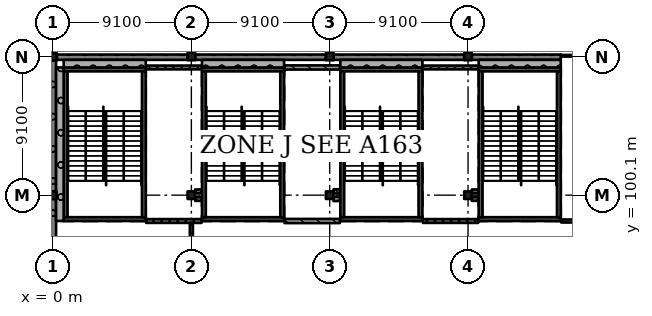
"""IFC4 building model, lengths in metres.
Left out: names, types, materials, properties, quantities, classifications, styles, units other than length and angle.
Written with IfcOpenShell. Run it as: python <this file> out.ifc"""

import sys

from ifc_helpers import new_model, si_unit, direction, frame, frame_2d, origin, origin_2d, place, context, subcontext, project, spatial, rectangle, extrude, element, fill, save


model = new_model("IFC4")
c1 = context("Model", 3, precision=1e-05, world=origin(), true_north=direction((0.0, 1.0)))
c2 = subcontext(c1, "Body", "Model", "MODEL_VIEW")
j1 = project(units=[si_unit("LENGTHUNIT", "METRE"), si_unit("PLANEANGLEUNIT", "RADIAN")], contexts=[c1])
p1 = place(None, origin())
s1 = spatial("IfcSite", under=j1, at=p1, CompositionType="ELEMENT")
p2 = place(p1, origin())
s2 = spatial("IfcBuilding", under=s1, at=p2, CompositionType="ELEMENT")
p3 = place(p2, frame((0.0, 0.0, 20.02)))
s3 = spatial("IfcBuildingStorey", under=s2, at=p3, CompositionType="ELEMENT", Elevation=20.02)
for number, where, z_axis, x_axis in (
    (1, (-0.025, 100.1, 0.0), (0.0, 0.0, 1.0), (1.0, 0.0, 0.0)),
    (2, (0.0, 109.2, 0.0), (0.0, 0.0, 1.0), (1.0, 0.0, 0.0)),
    (3, (9.1, 100.1, 0.0), (0.0, 0.0, 1.0), (1.0, 0.0, 0.0)),
    (4, (9.1, 109.225, 0.0), (0.0, 0.0, 1.0), (1.0, 0.0, 0.0)),
    (5, (18.2, 100.1, 0.0), (0.0, 0.0, 1.0), (1.0, 0.0, 0.0)),
    (6, (18.2, 109.225, 0.0), (0.0, 0.0, 1.0), (1.0, 0.0, 0.0)),
    (7, (27.3, 100.1, 0.0), (0.0, 0.0, 1.0), (1.0, 0.0, 0.0)),
    (8, (27.3, 109.225, 0.0), (0.0, 0.0, 1.0), (1.0, 0.0, 0.0)),
):
    element("IfcColumn", number, at=place(p3, frame(where, z_axis=z_axis, x_axis=x_axis)), inside=s3, PredefinedType="COLUMN", context=c2, shape_type="SweptSolid", body=[
        extrude(rectangle(XDim=0.5, YDim=0.5, at=origin_2d()), origin(), (0.0, 0.0, 1.0), 4.55),
    ])
p4 = place(p3, frame((6.1, 98.525, 0.0), z_axis=(0.0, 0.0, 1.0), x_axis=(-1.0, 0.0, 0.0)))
e9 = element("IfcWall", 9, at=p4, inside=s3, PredefinedType="SHEAR", context=c2, shape_type="SweptSolid", body=[
    extrude(rectangle(XDim=5.4, YDim=0.25, at=frame_2d((2.7, 0.0))), origin(), (0.0, 0.0, 1.0), 4.55),
])
p5 = place(p4, frame((1.5, 0.0, 0.0)))
e10 = element("IfcOpeningElement", 10, at=p5, cuts=e9, PredefinedType="OPENING", context=c2, shape_type="SweptSolid", body=[
    extrude(rectangle(XDim=2.4, YDim=2.1, at=frame_2d((1.2, 1.05))), frame((0.0, 0.135, 0.0), z_axis=(0.0, -1.0, 0.0), x_axis=(1.0, 0.0, 0.0)), (0.0, 0.0, 1.0), 0.27),
])
p6 = place(p3, frame((6.1, 108.375, 0.0), z_axis=(0.0, 0.0, 1.0), x_axis=(-1.0, 0.0, 0.0)))
e11 = element("IfcWall", 11, at=p6, inside=s3, PredefinedType="SHEAR", context=c2, shape_type="SweptSolid", body=[
    extrude(rectangle(XDim=5.4, YDim=0.25, at=frame_2d((2.7, 0.0))), origin(), (0.0, 0.0, 1.0), 4.55),
])
for number, where, z_axis, x_axis in (
    (12, (0.825, 108.25, 0.0), (0.0, 0.0, 1.0), (0.0, -1.0, 0.0)),
    (13, (5.975, 108.25, 0.0), (0.0, 0.0, 1.0), (0.0, -1.0, 0.0)),
):
    element("IfcWall", number, at=place(p3, frame(where, z_axis=z_axis, x_axis=x_axis)), inside=s3, PredefinedType="SHEAR", context=c2, shape_type="SweptSolid", body=[
        extrude(rectangle(XDim=9.6, YDim=0.25, at=frame_2d((4.8, 0.0))), origin(), (0.0, 0.0, 1.0), 4.55),
    ])
p7 = place(p3, frame((15.2, 98.525, 0.0), z_axis=(0.0, 0.0, 1.0), x_axis=(-1.0, 0.0, 0.0)))
e14 = element("IfcWall", 14, at=p7, inside=s3, PredefinedType="SHEAR", context=c2, shape_type="SweptSolid", body=[
    extrude(rectangle(XDim=5.4, YDim=0.25, at=frame_2d((2.7, 0.0))), origin(), (0.0, 0.0, 1.0), 4.55),
])
p8 = place(p7, frame((1.5, 0.0, 0.0)))
e15 = element("IfcOpeningElement", 15, at=p8, cuts=e14, PredefinedType="OPENING", context=c2, shape_type="SweptSolid", body=[
    extrude(rectangle(XDim=2.4, YDim=2.1, at=frame_2d((1.2, 1.05))), frame((0.0, 0.135, 0.0), z_axis=(0.0, -1.0, 0.0), x_axis=(1.0, 0.0, 0.0)), (0.0, 0.0, 1.0), 0.27),
])
p9 = place(p3, frame((15.2, 108.375, 0.0), z_axis=(0.0, 0.0, 1.0), x_axis=(-1.0, 0.0, 0.0)))
e16 = element("IfcWall", 16, at=p9, inside=s3, PredefinedType="SHEAR", context=c2, shape_type="SweptSolid", body=[
    extrude(rectangle(XDim=5.4, YDim=0.25, at=frame_2d((2.7, 0.0))), origin(), (0.0, 0.0, 1.0), 4.55),
])
for number, where, z_axis, x_axis in (
    (17, (9.925, 108.25, 0.0), (0.0, 0.0, 1.0), (0.0, -1.0, 0.0)),
    (18, (15.075, 108.25, 0.0), (0.0, 0.0, 1.0), (0.0, -1.0, 0.0)),
):
    element("IfcWall", number, at=place(p3, frame(where, z_axis=z_axis, x_axis=x_axis)), inside=s3, PredefinedType="SHEAR", context=c2, shape_type="SweptSolid", body=[
        extrude(rectangle(XDim=9.6, YDim=0.25, at=frame_2d((4.8, 0.0))), origin(), (0.0, 0.0, 1.0), 4.55),
    ])
p10 = place(p3, frame((24.3, 98.525, 0.0), z_axis=(0.0, 0.0, 1.0), x_axis=(-1.0, 0.0, 0.0)))
e19 = element("IfcWall", 19, at=p10, inside=s3, PredefinedType="SHEAR", context=c2, shape_type="SweptSolid", body=[
    extrude(rectangle(XDim=5.4, YDim=0.25, at=frame_2d((2.7, 0.0))), origin(), (0.0, 0.0, 1.0), 4.55),
])
p11 = place(p10, frame((1.5, 0.0, 0.0)))
e20 = element("IfcOpeningElement", 20, at=p11, cuts=e19, PredefinedType="OPENING", context=c2, shape_type="SweptSolid", body=[
    extrude(rectangle(XDim=2.4, YDim=2.1, at=frame_2d((1.2, 1.05))), frame((0.0, 0.135, 0.0), z_axis=(0.0, -1.0, 0.0), x_axis=(1.0, 0.0, 0.0)), (0.0, 0.0, 1.0), 0.27),
])
p12 = place(p3, frame((24.3, 108.375, 0.0), z_axis=(0.0, 0.0, 1.0), x_axis=(-1.0, 0.0, 0.0)))
e21 = element("IfcWall", 21, at=p12, inside=s3, PredefinedType="SHEAR", context=c2, shape_type="SweptSolid", body=[
    extrude(rectangle(XDim=5.4, YDim=0.25, at=frame_2d((2.7, 0.0))), origin(), (0.0, 0.0, 1.0), 4.55),
])
for number, where, z_axis, x_axis in (
    (22, (19.025, 108.25, 0.0), (0.0, 0.0, 1.0), (0.0, -1.0, 0.0)),
    (23, (24.175, 108.25, 0.0), (0.0, 0.0, 1.0), (0.0, -1.0, 0.0)),
):
    element("IfcWall", number, at=place(p3, frame(where, z_axis=z_axis, x_axis=x_axis)), inside=s3, PredefinedType="SHEAR", context=c2, shape_type="SweptSolid", body=[
        extrude(rectangle(XDim=9.6, YDim=0.25, at=frame_2d((4.8, 0.0))), origin(), (0.0, 0.0, 1.0), 4.55),
    ])
p13 = place(p3, frame((33.4, 98.525, 0.0), z_axis=(0.0, 0.0, 1.0), x_axis=(-1.0, 0.0, 0.0)))
e24 = element("IfcWall", 24, at=p13, inside=s3, PredefinedType="SHEAR", context=c2, shape_type="SweptSolid", body=[
    extrude(rectangle(XDim=5.4, YDim=0.25, at=frame_2d((2.7, 0.0))), origin(), (0.0, 0.0, 1.0), 4.55),
])
p14 = place(p13, frame((1.5, 0.0, 0.0)))
e25 = element("IfcOpeningElement", 25, at=p14, cuts=e24, PredefinedType="OPENING", context=c2, shape_type="SweptSolid", body=[
    extrude(rectangle(XDim=2.4, YDim=2.1, at=frame_2d((1.2, 1.05))), frame((0.0, 0.135, 0.0), z_axis=(0.0, -1.0, 0.0), x_axis=(1.0, 0.0, 0.0)), (0.0, 0.0, 1.0), 0.27),
])
p15 = place(p3, frame((33.4, 108.375, 0.0), z_axis=(0.0, 0.0, 1.0), x_axis=(-1.0, 0.0, 0.0)))
e26 = element("IfcWall", 26, at=p15, inside=s3, PredefinedType="SHEAR", context=c2, shape_type="SweptSolid", body=[
    extrude(rectangle(XDim=5.4, YDim=0.25, at=frame_2d((2.7, 0.0))), origin(), (0.0, 0.0, 1.0), 4.55),
])
for number, where, z_axis, x_axis in (
    (27, (28.125, 108.25, 0.0), (0.0, 0.0, 1.0), (0.0, -1.0, 0.0)),
    (28, (33.275, 108.25, 0.0), (0.0, 0.0, 1.0), (0.0, -1.0, 0.0)),
):
    element("IfcWall", number, at=place(p3, frame(where, z_axis=z_axis, x_axis=x_axis)), inside=s3, PredefinedType="SHEAR", context=c2, shape_type="SweptSolid", body=[
        extrude(rectangle(XDim=9.6, YDim=0.25, at=frame_2d((4.8, 0.0))), origin(), (0.0, 0.0, 1.0), 4.55),
    ])
p16 = place(p3, frame((33.4, 109.175, 0.0), z_axis=(0.0, 0.0, 1.0), x_axis=(-1.0, 0.0, 0.0)))
e29 = element("IfcWall", 29, at=p16, inside=s3, PredefinedType="SOLIDWALL", context=c2, shape_type="SweptSolid", body=[
    extrude(rectangle(XDim=5.85, YDim=0.35, at=frame_2d((2.925, 0.0))), origin(), (0.0, 0.0, 1.0), 3.5),
])
p17 = place(p3, frame((27.05, 109.175, 0.0), z_axis=(0.0, 0.0, 1.0), x_axis=(-1.0, 0.0, 0.0)))
e30 = element("IfcWall", 30, at=p17, inside=s3, PredefinedType="SOLIDWALL", context=c2, shape_type="SweptSolid", body=[
    extrude(rectangle(XDim=8.6, YDim=0.35, at=frame_2d((4.3, 0.0))), origin(), (0.0, 0.0, 1.0), 3.5),
])
p18 = place(p3, frame((17.95, 109.175, 0.0), z_axis=(0.0, 0.0, 1.0), x_axis=(-1.0, 0.0, 0.0)))
e31 = element("IfcWall", 31, at=p18, inside=s3, PredefinedType="SOLIDWALL", context=c2, shape_type="SweptSolid", body=[
    extrude(rectangle(XDim=8.6, YDim=0.35, at=frame_2d((4.3, 0.0))), origin(), (0.0, 0.0, 1.0), 3.5),
])
p19 = place(p3, frame((8.85, 109.175, 0.0), z_axis=(0.0, 0.0, 1.0), x_axis=(-1.0, 0.0, 0.0)))
e32 = element("IfcWall", 32, at=p19, inside=s3, PredefinedType="SOLIDWALL", context=c2, shape_type="SweptSolid", body=[
    extrude(rectangle(XDim=8.6, YDim=0.35, at=frame_2d((4.3, 0.0))), origin(), (0.0, 0.0, 1.0), 3.5),
])
p20 = place(p3, frame((0.025, 108.95, 0.0), z_axis=(0.0, 0.0, 1.0), x_axis=(0.0, -1.0, 0.0)))
e33 = element("IfcWall", 33, at=p20, inside=s3, PredefinedType="SOLIDWALL", context=c2, shape_type="SweptSolid", body=[
    extrude(rectangle(XDim=8.6, YDim=0.35, at=frame_2d((4.3, 0.0))), origin(), (0.0, 0.0, 1.0), 3.5),
])
p21 = place(p3, frame((0.025, 99.85, 0.0), z_axis=(0.0, 0.0, 1.0), x_axis=(0.0, -1.0, 0.0)))
e34 = element("IfcWall", 34, at=p21, inside=s3, PredefinedType="SOLIDWALL", context=c2, shape_type="SweptSolid", body=[
    extrude(rectangle(XDim=8.6, YDim=0.35, at=frame_2d((4.3, 0.0))), origin(), (0.0, 0.0, 1.0), 3.5),
])
p22 = place(p3, frame((0.7, 108.75, 0.0), z_axis=(0.0, 0.0, 1.0), x_axis=(1.0, 0.0, 0.0)))
e35 = element("IfcWall", 35, at=p22, inside=s3, PredefinedType="SOLIDWALL", context=c2, shape_type="SweptSolid", body=[
    extrude(rectangle(XDim=5.4, YDim=0.5, at=frame_2d((2.7, 0.0))), origin(), (0.0, 0.0, 1.0), 4.25),
])
p23 = place(p3, frame((0.45, 98.4, 0.0), z_axis=(0.0, 0.0, 1.0), x_axis=(0.0, 1.0, 0.0)))
e36 = element("IfcWall", 36, at=p23, inside=s3, PredefinedType="SOLIDWALL", context=c2, shape_type="SweptSolid", body=[
    extrude(rectangle(XDim=10.1, YDim=0.5, at=frame_2d((5.05, 0.0))), origin(), (0.0, 0.0, 1.0), 4.25),
])
p24 = place(p3, frame((9.8, 108.75, 0.0), z_axis=(0.0, 0.0, 1.0), x_axis=(1.0, 0.0, 0.0)))
e37 = element("IfcWall", 37, at=p24, inside=s3, PredefinedType="SOLIDWALL", context=c2, shape_type="SweptSolid", body=[
    extrude(rectangle(XDim=5.4, YDim=0.5, at=frame_2d((2.7, 0.0))), origin(), (0.0, 0.0, 1.0), 4.25),
])
p25 = place(p3, frame((18.9, 108.75, 0.0), z_axis=(0.0, 0.0, 1.0), x_axis=(1.0, 0.0, 0.0)))
e38 = element("IfcWall", 38, at=p25, inside=s3, PredefinedType="SOLIDWALL", context=c2, shape_type="SweptSolid", body=[
    extrude(rectangle(XDim=5.4, YDim=0.5, at=frame_2d((2.7, 0.0))), origin(), (0.0, 0.0, 1.0), 4.25),
])
p26 = place(p3, frame((28.0, 108.75, 0.0), z_axis=(0.0, 0.0, 1.0), x_axis=(1.0, 0.0, 0.0)))
e39 = element("IfcWall", 39, at=p26, inside=s3, PredefinedType="SOLIDWALL", context=c2, shape_type="SweptSolid", body=[
    extrude(rectangle(XDim=5.4, YDim=0.5, at=frame_2d((2.7, 0.0))), origin(), (0.0, 0.0, 1.0), 4.25),
])
p27 = place(p3, frame((6.13, 98.4, 0.0), z_axis=(0.0, 0.0, 1.0), x_axis=(1.0, 0.0, 0.0)))
e40 = element("IfcWall", 40, at=p27, inside=s3, PredefinedType="SOLIDWALL", context=c2, shape_type="SweptSolid", body=[
    extrude(rectangle(XDim=3.64, YDim=0.25, at=frame_2d((1.82, 0.0))), origin(), (0.0, 0.0, 1.0), 4.25),
])
p28 = place(p27, frame((0.95, 0.0, 0.0)))
e41 = element("IfcOpeningElement", 41, at=p28, cuts=e40, PredefinedType="OPENING", context=c2, shape_type="SweptSolid", body=[
    extrude(rectangle(XDim=1.0, YDim=2.1, at=frame_2d((0.5, 1.05))), frame((0.0, 0.135, 0.0), z_axis=(0.0, -1.0, 0.0), x_axis=(1.0, 0.0, 0.0)), (0.0, 0.0, 1.0), 0.27),
])
p29 = place(p3, frame((6.13, 108.5, 0.0), z_axis=(0.0, 0.0, 1.0), x_axis=(1.0, 0.0, 0.0)))
e42 = element("IfcWall", 42, at=p29, inside=s3, PredefinedType="SOLIDWALL", context=c2, shape_type="SweptSolid", body=[
    extrude(rectangle(XDim=3.64, YDim=0.25, at=frame_2d((1.82, 0.0))), origin(), (0.0, 0.0, 1.0), 4.25),
])
p30 = place(p3, frame((9.1, 98.275, 0.0), z_axis=(0.0, 0.0, 1.0), x_axis=(0.0, -1.0, 0.0)))
e43 = element("IfcWall", 43, at=p30, inside=s3, PredefinedType="PARTITIONING", context=c2, shape_type="SweptSolid", body=[
    extrude(rectangle(XDim=6.975, YDim=0.2, at=frame_2d((3.487, 0.0))), origin(), (0.0, 0.0, 1.0), 3.5),
])
p31 = place(p30, frame((0.85, 0.0, 0.0)))
e44 = element("IfcOpeningElement", 44, at=p31, cuts=e43, PredefinedType="OPENING", context=c2, shape_type="SweptSolid", body=[
    extrude(rectangle(XDim=1.8, YDim=2.4, at=frame_2d((0.9, 1.2))), frame((0.0, 0.11, 0.0), z_axis=(0.0, -1.0, 0.0), x_axis=(1.0, 0.0, 0.0)), (0.0, 0.0, 1.0), 0.22),
])
p32 = place(p30, frame((4.35, 0.0, 0.0)))
e45 = element("IfcOpeningElement", 45, at=p32, cuts=e43, PredefinedType="OPENING", context=c2, shape_type="SweptSolid", body=[
    extrude(rectangle(XDim=1.8, YDim=2.4, at=frame_2d((0.9, 1.2))), frame((0.0, 0.11, 0.0), z_axis=(0.0, -1.0, 0.0), x_axis=(1.0, 0.0, 0.0)), (0.0, 0.0, 1.0), 0.22),
])
for number, where, z_axis, x_axis in (
    (46, (9.35, 99.85, 0.0), (0.0, 0.0, 1.0), (1.0, 0.0, 0.0)),
    (47, (9.77, 100.35, 0.0), (0.0, 0.0, 1.0), (-1.0, 0.0, 0.0)),
):
    element("IfcWall", number, at=place(p3, frame(where, z_axis=z_axis, x_axis=x_axis)), inside=s3, PredefinedType="SOLIDWALL", context=c2, shape_type="SweptSolid", body=[
        extrude(rectangle(XDim=0.42, YDim=0.25, at=frame_2d((0.21, 0.0))), origin(), (0.0, 0.0, 1.0), 4.25),
    ])
p33 = place(p3, frame((15.23, 98.4, 0.0), z_axis=(0.0, 0.0, 1.0), x_axis=(1.0, 0.0, 0.0)))
e48 = element("IfcWall", 48, at=p33, inside=s3, PredefinedType="SOLIDWALL", context=c2, shape_type="SweptSolid", body=[
    extrude(rectangle(XDim=3.64, YDim=0.275, at=frame_2d((1.82, 0.0))), origin(), (0.0, 0.0, 1.0), 4.25),
])
p34 = place(p33, frame((1.25, 0.0, 0.0)))
e49 = element("IfcOpeningElement", 49, at=p34, cuts=e48, PredefinedType="OPENING", context=c2, shape_type="SweptSolid", body=[
    extrude(rectangle(XDim=1.2, YDim=2.4, at=frame_2d((0.6, 1.2))), frame((0.0, 0.147, 0.0), z_axis=(0.0, -1.0, 0.0), x_axis=(1.0, 0.0, 0.0)), (0.0, 0.0, 1.0), 0.295),
])
p35 = place(p3, frame((15.23, 108.5, 0.0), z_axis=(0.0, 0.0, 1.0), x_axis=(1.0, 0.0, 0.0)))
e50 = element("IfcWall", 50, at=p35, inside=s3, PredefinedType="SOLIDWALL", context=c2, shape_type="SweptSolid", body=[
    extrude(rectangle(XDim=3.64, YDim=0.275, at=frame_2d((1.82, 0.0))), origin(), (0.0, 0.0, 1.0), 4.25),
])
for number, where, z_axis, x_axis in (
    (51, (18.45, 99.85, 0.0), (0.0, 0.0, 1.0), (1.0, 0.0, 0.0)),
    (52, (18.87, 100.35, 0.0), (0.0, 0.0, 1.0), (-1.0, 0.0, 0.0)),
):
    element("IfcWall", number, at=place(p3, frame(where, z_axis=z_axis, x_axis=x_axis)), inside=s3, PredefinedType="SOLIDWALL", context=c2, shape_type="SweptSolid", body=[
        extrude(rectangle(XDim=0.42, YDim=0.275, at=frame_2d((0.21, 0.0))), origin(), (0.0, 0.0, 1.0), 4.25),
    ])
p36 = place(p3, frame((24.33, 98.4, 0.0), z_axis=(0.0, 0.0, 1.0), x_axis=(1.0, 0.0, 0.0)))
e53 = element("IfcWall", 53, at=p36, inside=s3, PredefinedType="SOLIDWALL", context=c2, shape_type="SweptSolid", body=[
    extrude(rectangle(XDim=3.64, YDim=0.25, at=frame_2d((1.82, 0.0))), origin(), (0.0, 0.0, 1.0), 4.25),
])
p37 = place(p36, frame((1.45, 0.0, 0.0)))
e54 = element("IfcOpeningElement", 54, at=p37, cuts=e53, PredefinedType="OPENING", context=c2, shape_type="SweptSolid", body=[
    extrude(rectangle(XDim=0.8, YDim=2.1, at=frame_2d((0.4, 1.05))), frame((0.0, 0.135, 0.0), z_axis=(0.0, -1.0, 0.0), x_axis=(1.0, 0.0, 0.0)), (0.0, 0.0, 1.0), 0.27),
])
p38 = place(p3, frame((24.33, 108.5, 0.0), z_axis=(0.0, 0.0, 1.0), x_axis=(1.0, 0.0, 0.0)))
e55 = element("IfcWall", 55, at=p38, inside=s3, PredefinedType="SOLIDWALL", context=c2, shape_type="SweptSolid", body=[
    extrude(rectangle(XDim=3.64, YDim=0.25, at=frame_2d((1.82, 0.0))), origin(), (0.0, 0.0, 1.0), 4.25),
])
for number, where, z_axis, x_axis in (
    (56, (27.55, 99.85, 0.0), (0.0, 0.0, 1.0), (1.0, 0.0, 0.0)),
    (57, (27.97, 100.35, 0.0), (0.0, 0.0, 1.0), (-1.0, 0.0, 0.0)),
):
    element("IfcWall", number, at=place(p3, frame(where, z_axis=z_axis, x_axis=x_axis)), inside=s3, PredefinedType="SOLIDWALL", context=c2, shape_type="SweptSolid", body=[
        extrude(rectangle(XDim=0.42, YDim=0.25, at=frame_2d((0.21, 0.0))), origin(), (0.0, 0.0, 1.0), 4.25),
    ])
p39 = place(p3, frame((33.43, 98.4, 0.0), z_axis=(0.0, 0.0, 1.0), x_axis=(1.0, 0.0, 0.0)))
e58 = element("IfcWall", 58, at=p39, inside=s3, PredefinedType="PARTITIONING", context=c2, shape_type="SweptSolid", body=[
    extrude(rectangle(XDim=2.77, YDim=0.2, at=frame_2d((1.385, 0.0))), origin(), (0.0, 0.0, 1.0), 4.25),
])
p40 = place(p39, frame((0.45, 0.0, 0.0)))
e59 = element("IfcOpeningElement", 59, at=p40, cuts=e58, PredefinedType="OPENING", context=c2, shape_type="SweptSolid", body=[
    extrude(rectangle(XDim=1.8, YDim=2.4, at=frame_2d((0.9, 1.2))), frame((0.0, 0.11, 0.0), z_axis=(0.0, -1.0, 0.0), x_axis=(1.0, 0.0, 0.0)), (0.0, 0.0, 1.0), 0.22),
])
p41 = place(p28, origin())
e60 = element("IfcDoor", 60, at=p41, inside=s3, OperationType="SINGLE_SWING_RIGHT", PredefinedType="DOOR", context=c2, shape_type="SweptSolid", body=[
    extrude(rectangle(XDim=1.0, YDim=2.1, at=frame_2d((0.5, 1.05))), frame((0.0, 0.025, 0.0), z_axis=(0.0, -1.0, 0.0), x_axis=(1.0, 0.0, 0.0)), (0.0, 0.0, 1.0), 0.05),
])
fill(e41, e60)
p42 = place(p34, origin())
e61 = element("IfcDoor", 61, at=p42, inside=s3, OperationType="SINGLE_SWING_LEFT", PredefinedType="DOOR", context=c2, shape_type="SweptSolid", body=[
    extrude(rectangle(XDim=1.2, YDim=2.4, at=frame_2d((0.6, 1.2))), frame((0.0, 0.025, 0.0), z_axis=(0.0, -1.0, 0.0), x_axis=(1.0, 0.0, 0.0)), (0.0, 0.0, 1.0), 0.05),
])
fill(e49, e61)
p43 = place(p37, origin())
e62 = element("IfcDoor", 62, at=p43, inside=s3, OperationType="SINGLE_SWING_LEFT", PredefinedType="DOOR", context=c2, shape_type="SweptSolid", body=[
    extrude(rectangle(XDim=0.8, YDim=2.1, at=frame_2d((0.4, 1.05))), frame((0.0, 0.025, 0.0), z_axis=(0.0, -1.0, 0.0), x_axis=(1.0, 0.0, 0.0)), (0.0, 0.0, 1.0), 0.05),
])
fill(e54, e62)
p44 = place(p31, origin())
e63 = element("IfcDoor", 63, at=p44, inside=s3, OperationType="DOUBLE_DOOR_SINGLE_SWING", PredefinedType="DOOR", context=c2, shape_type="SweptSolid", body=[
    extrude(rectangle(XDim=1.8, YDim=2.4, at=frame_2d((0.9, 1.2))), frame((0.0, 0.025, 0.0), z_axis=(0.0, -1.0, 0.0), x_axis=(1.0, 0.0, 0.0)), (0.0, 0.0, 1.0), 0.05),
])
fill(e44, e63)
p45 = place(p40, origin())
e64 = element("IfcDoor", 64, at=p45, inside=s3, OperationType="DOUBLE_DOOR_SINGLE_SWING", PredefinedType="DOOR", context=c2, shape_type="SweptSolid", body=[
    extrude(rectangle(XDim=1.8, YDim=2.4, at=frame_2d((0.9, 1.2))), frame((0.0, 0.025, 0.0), z_axis=(0.0, -1.0, 0.0), x_axis=(1.0, 0.0, 0.0)), (0.0, 0.0, 1.0), 0.05),
])
fill(e59, e64)
p46 = place(p5, origin())
e65 = element("IfcDoor", 65, at=p46, inside=s3, OperationType="DOUBLE_DOOR_SINGLE_SWING", PredefinedType="DOOR", context=c2, shape_type="SweptSolid", body=[
    extrude(rectangle(XDim=2.4, YDim=2.1, at=frame_2d((1.2, 1.05))), frame((0.0, 0.025, 0.0), z_axis=(0.0, -1.0, 0.0), x_axis=(1.0, 0.0, 0.0)), (0.0, 0.0, 1.0), 0.05),
])
fill(e10, e65)
p47 = place(p8, origin())
e66 = element("IfcDoor", 66, at=p47, inside=s3, OperationType="DOUBLE_DOOR_SINGLE_SWING", PredefinedType="DOOR", context=c2, shape_type="SweptSolid", body=[
    extrude(rectangle(XDim=2.4, YDim=2.1, at=frame_2d((1.2, 1.05))), frame((0.0, 0.025, 0.0), z_axis=(0.0, -1.0, 0.0), x_axis=(1.0, 0.0, 0.0)), (0.0, 0.0, 1.0), 0.05),
])
fill(e15, e66)
p48 = place(p11, origin())
e67 = element("IfcDoor", 67, at=p48, inside=s3, OperationType="DOUBLE_DOOR_SINGLE_SWING", PredefinedType="DOOR", context=c2, shape_type="SweptSolid", body=[
    extrude(rectangle(XDim=2.4, YDim=2.1, at=frame_2d((1.2, 1.05))), frame((0.0, 0.025, 0.0), z_axis=(0.0, -1.0, 0.0), x_axis=(1.0, 0.0, 0.0)), (0.0, 0.0, 1.0), 0.05),
])
fill(e20, e67)
p49 = place(p14, origin())
e68 = element("IfcDoor", 68, at=p49, inside=s3, OperationType="DOUBLE_DOOR_SINGLE_SWING", PredefinedType="DOOR", context=c2, shape_type="SweptSolid", body=[
    extrude(rectangle(XDim=2.4, YDim=2.1, at=frame_2d((1.2, 1.05))), frame((0.0, 0.025, 0.0), z_axis=(0.0, -1.0, 0.0), x_axis=(1.0, 0.0, 0.0)), (0.0, 0.0, 1.0), 0.05),
])
fill(e25, e68)
save(model, sys.argv[1])
